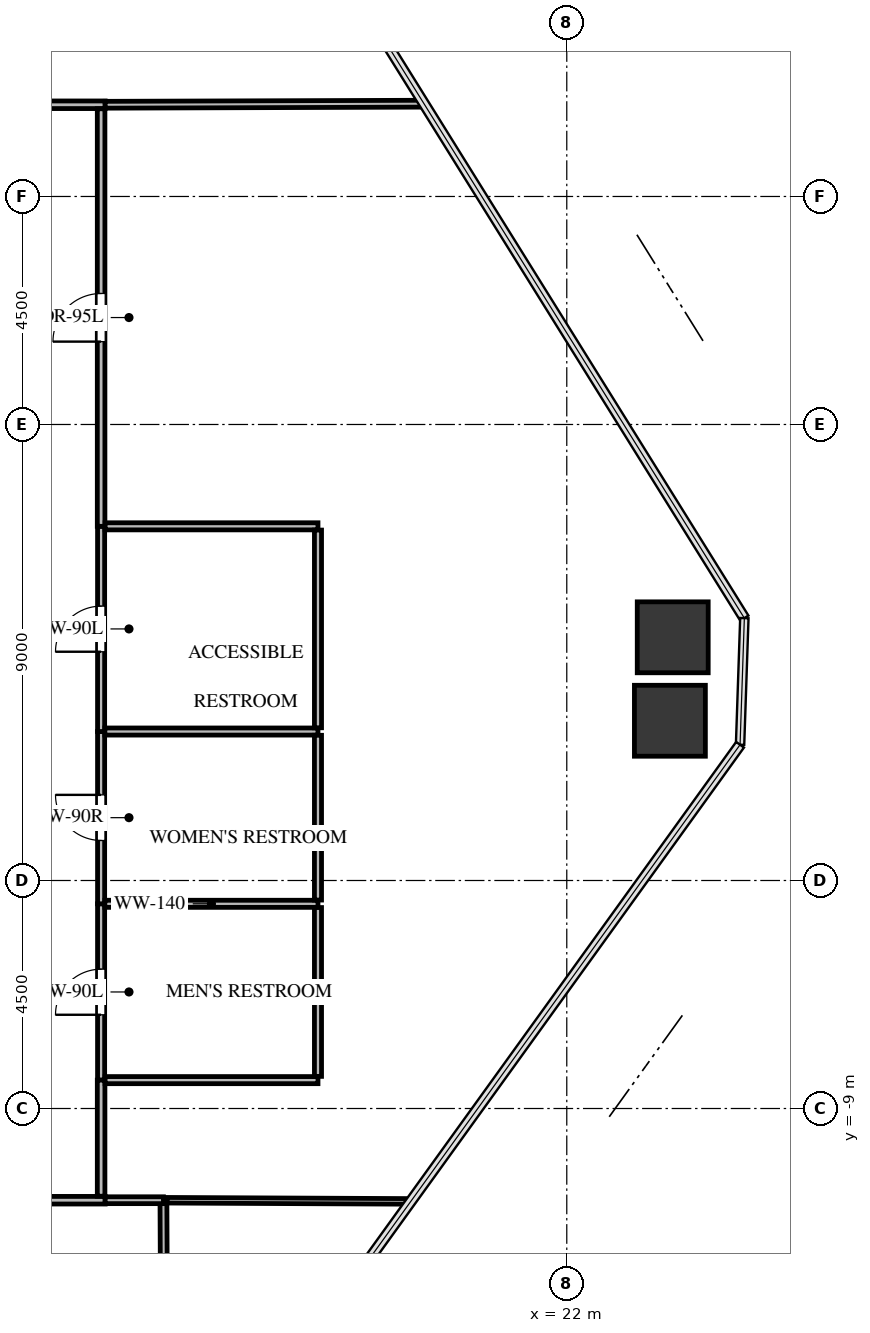
"""IFC4 building model, lengths in metres.
Left out: names, types, materials, properties, quantities, classifications, styles, units other than length and angle.
Written with IfcOpenShell. Run it as: python <this file> out.ifc"""

import sys

from ifc_helpers import new_model, si_unit, direction, frame, frame_2d, origin, origin_2d, place, context, subcontext, project, spatial, rectangle, extrude, source, transform, mapped, element, fill, save


model = new_model("IFC4")
c1 = context("Model", 3, precision=1e-05, world=origin(), true_north=direction((0.0, 1.0)))
c2 = subcontext(c1, "Body", "Model", "MODEL_VIEW")
j1 = project(units=[si_unit("LENGTHUNIT", "METRE"), si_unit("PLANEANGLEUNIT", "RADIAN")], contexts=[c1])
p1 = place(None, origin())
s1 = spatial("IfcSite", under=j1, at=p1, CompositionType="ELEMENT")
p2 = place(p1, origin())
s2 = spatial("IfcBuilding", under=s1, at=p2, CompositionType="ELEMENT")
p3 = place(p2, frame((0.0, 0.0, 84.3)))
s3 = spatial("IfcBuildingStorey", under=s2, at=p3, CompositionType="ELEMENT", Elevation=84.3)
m1 = source(origin(), c2, "Body", "SweptSolid", [
    extrude(rectangle(XDim=1.4, YDim=1.4, at=origin_2d()), origin(), (0.0, 0.0, 1.0), 4.14),
])
for number, where, z_axis, x_axis in (
    (1, (24.091, 0.3, -0.24), (0.0, 0.0, 1.0), (1.0, 0.0, 0.0)),
    (2, (24.035, -1.347, -0.24), (0.0, 0.0, 1.0), (1.0, 0.0, 0.0)),
):
    element("IfcColumn", number, at=place(p3, frame(where, z_axis=z_axis, x_axis=x_axis)), inside=s3, PredefinedType="COLUMN", context=c2, shape_type="MappedRepresentation", body=[
        mapped(m1, transform((0.0, 0.0, 0.0), x_axis=(1.0, 0.0, 0.0), y_axis=(0.0, 1.0, 0.0), z_axis=(0.0, 0.0, 1.0), scale=1.0)),
    ])
p4 = place(p3, frame((12.81, -8.44, 0.0), z_axis=(0.0, 0.0, 1.0), x_axis=(0.0, 1.0, 0.0)))
e3 = element("IfcWall", 3, at=p4, inside=s3, PredefinedType="PARTITIONING", context=c2, shape_type="SweptSolid", body=[
    extrude(rectangle(XDim=3.48, YDim=0.14, at=frame_2d((1.74, 0.0))), origin(), (0.0, 0.0, 1.0), 3.885),
])
p5 = place(p4, frame((1.29, 0.0, 0.0)))
e4 = element("IfcOpeningElement", 4, at=p5, cuts=e3, PredefinedType="OPENING", context=c2, shape_type="SweptSolid", body=[
    extrude(rectangle(XDim=0.9, YDim=2.05, at=frame_2d((0.45, 1.025))), frame((0.0, 0.08, 0.0), z_axis=(0.0, -1.0, 0.0), x_axis=(1.0, 0.0, 0.0)), (0.0, 0.0, 1.0), 0.16),
])
p6 = place(p3, frame((12.81, -4.96, 0.0), z_axis=(0.0, 0.0, 1.0), x_axis=(0.0, 1.0, 0.0)))
e5 = element("IfcWall", 5, at=p6, inside=s3, PredefinedType="PARTITIONING", context=c2, shape_type="SweptSolid", body=[
    extrude(rectangle(XDim=3.4, YDim=0.14, at=frame_2d((1.7, 0.0))), origin(), (0.0, 0.0, 1.0), 3.885),
])
p7 = place(p6, frame((1.25, 0.0, 0.0)))
e6 = element("IfcOpeningElement", 6, at=p7, cuts=e5, PredefinedType="OPENING", context=c2, shape_type="SweptSolid", body=[
    extrude(rectangle(XDim=0.9, YDim=2.05, at=frame_2d((0.45, 1.025))), frame((0.0, 0.08, 0.0), z_axis=(0.0, -1.0, 0.0), x_axis=(1.0, 0.0, 0.0)), (0.0, 0.0, 1.0), 0.16),
])
p8 = place(p3, frame((12.81, -1.56, 0.0), z_axis=(0.0, 0.0, 1.0), x_axis=(0.0, 1.0, 0.0)))
e7 = element("IfcWall", 7, at=p8, inside=s3, PredefinedType="PARTITIONING", context=c2, shape_type="SweptSolid", body=[
    extrude(rectangle(XDim=4.05, YDim=0.14, at=frame_2d((2.025, 0.0))), origin(), (0.0, 0.0, 1.0), 2.32),
])
p9 = place(p8, frame((1.575, 0.0, 0.0)))
e8 = element("IfcOpeningElement", 8, at=p9, cuts=e7, PredefinedType="OPENING", context=c2, shape_type="SweptSolid", body=[
    extrude(rectangle(XDim=0.9, YDim=2.05, at=frame_2d((0.45, 1.025))), frame((0.0, 0.08, 0.0), z_axis=(0.0, -1.0, 0.0), x_axis=(1.0, 0.0, 0.0)), (0.0, 0.0, 1.0), 0.16),
])
p10 = place(p3, frame((12.89, 10.81, 0.0), z_axis=(0.0, 0.0, 1.0), x_axis=(-1.0, 0.0, 0.0)))
e9 = element("IfcWall", 9, at=p10, inside=s3, PredefinedType="PARTITIONING", context=c2, shape_type="SweptSolid", body=[
    extrude(rectangle(XDim=9.85, YDim=0.15, at=frame_2d((4.925, 0.0))), origin(), (0.0, 0.0, 1.0), 2.32),
])
p11 = place(p10, frame((4.45, 0.0, 0.0)))
e10 = element("IfcOpeningElement", 10, at=p11, cuts=e9, PredefinedType="OPENING", context=c2, shape_type="SweptSolid", body=[
    extrude(rectangle(XDim=0.95, YDim=2.1, at=frame_2d((0.475, 1.05))), frame((0.0, 0.085, 0.0), z_axis=(0.0, -1.0, 0.0), x_axis=(1.0, 0.0, 0.0)), (0.0, 0.0, 1.0), 0.17),
])
p12 = place(p3, frame((5.04, -10.81, 0.0), z_axis=(0.0, 0.0, 1.0), x_axis=(1.0, 0.0, 0.0)))
e11 = element("IfcWall", 11, at=p12, inside=s3, PredefinedType="PARTITIONING", context=c2, shape_type="SweptSolid", body=[
    extrude(rectangle(XDim=7.85, YDim=0.15, at=frame_2d((3.925, 0.0))), origin(), (0.0, 0.0, 1.0), 2.32),
])
p13 = place(p12, frame((3.465, 0.0, 0.0)))
e12 = element("IfcOpeningElement", 12, at=p13, cuts=e11, PredefinedType="OPENING", context=c2, shape_type="SweptSolid", body=[
    extrude(rectangle(XDim=0.92, YDim=2.1, at=frame_2d((0.46, 1.05))), frame((0.0, 0.085, 0.0), z_axis=(0.0, -1.0, 0.0), x_axis=(1.0, 0.0, 0.0)), (0.0, 0.0, 1.0), 0.17),
])
p14 = place(p3, frame((12.81, 2.49, 0.0), z_axis=(0.0, 0.0, 1.0), x_axis=(0.0, 1.0, 0.0)))
e13 = element("IfcWall", 13, at=p14, inside=s3, PredefinedType="PARTITIONING", context=c2, shape_type="SweptSolid", body=[
    extrude(rectangle(XDim=8.241, YDim=0.15, at=frame_2d((4.121, 0.0))), origin(), (0.0, 0.0, 1.0), 3.885),
])
p15 = place(p14, frame((3.646, 0.0, 0.0)))
e14 = element("IfcOpeningElement", 14, at=p15, cuts=e13, PredefinedType="OPENING", context=c2, shape_type="SweptSolid", body=[
    extrude(rectangle(XDim=0.95, YDim=2.1, at=frame_2d((0.475, 1.05))), frame((0.0, 0.085, 0.0), z_axis=(0.0, -1.0, 0.0), x_axis=(1.0, 0.0, 0.0)), (0.0, 0.0, 1.0), 0.17),
])
p16 = place(p3, frame((12.81, -10.731, 0.0), z_axis=(0.0, 0.0, 1.0), x_axis=(0.0, 1.0, 0.0)))
e15 = element("IfcWall", 15, at=p16, inside=s3, PredefinedType="PARTITIONING", context=c2, shape_type="SweptSolid", body=[
    extrude(rectangle(XDim=2.291, YDim=0.15, at=frame_2d((1.146, 0.0))), origin(), (0.0, 0.0, 1.0), 3.885),
])
p17 = place(p3, frame((12.884, -4.96, 0.0), z_axis=(0.0, 0.0, 1.0), x_axis=(1.0, 0.0, 0.0)))
e16 = element("IfcWall", 16, at=p17, inside=s3, PredefinedType="PARTITIONING", context=c2, shape_type="SweptSolid", body=[
    extrude(rectangle(XDim=4.206, YDim=0.14, at=frame_2d((2.103, 0.0))), origin(), (0.0, 0.0, 1.0), 3.885),
])
p18 = place(p3, frame((17.09, -8.44, 0.0), z_axis=(0.0, 0.0, 1.0), x_axis=(-1.0, 0.0, 0.0)))
e17 = element("IfcWall", 17, at=p18, inside=s3, PredefinedType="PARTITIONING", context=c2, shape_type="SweptSolid", body=[
    extrude(rectangle(XDim=4.201, YDim=0.14, at=frame_2d((2.101, 0.0))), origin(), (0.0, 0.0, 1.0), 3.885),
])
p19 = place(p3, frame((17.09, -5.034, 0.0), z_axis=(0.0, 0.0, 1.0), x_axis=(0.0, -1.0, 0.0)))
e18 = element("IfcWall", 18, at=p19, inside=s3, PredefinedType="PARTITIONING", context=c2, shape_type="SweptSolid", body=[
    extrude(rectangle(XDim=3.332, YDim=0.14, at=frame_2d((1.666, 0.0))), origin(), (0.0, 0.0, 1.0), 3.885),
])
p20 = place(p3, frame((12.884, -1.56, 0.0), z_axis=(0.0, 0.0, 1.0), x_axis=(1.0, 0.0, 0.0)))
e19 = element("IfcWall", 19, at=p20, inside=s3, PredefinedType="PARTITIONING", context=c2, shape_type="SweptSolid", body=[
    extrude(rectangle(XDim=4.206, YDim=0.14, at=frame_2d((2.103, 0.0))), origin(), (0.0, 0.0, 1.0), 3.885),
])
p21 = place(p3, frame((17.09, -1.634, 0.0), z_axis=(0.0, 0.0, 1.0), x_axis=(0.0, -1.0, 0.0)))
e20 = element("IfcWall", 20, at=p21, inside=s3, PredefinedType="PARTITIONING", context=c2, shape_type="SweptSolid", body=[
    extrude(rectangle(XDim=3.252, YDim=0.14, at=frame_2d((1.626, 0.0))), origin(), (0.0, 0.0, 1.0), 3.885),
])
p22 = place(p3, frame((12.889, 2.49, 0.0), z_axis=(0.0, 0.0, 1.0), x_axis=(1.0, 0.0, 0.0)))
e21 = element("IfcWall", 21, at=p22, inside=s3, PredefinedType="PARTITIONING", context=c2, shape_type="SweptSolid", body=[
    extrude(rectangle(XDim=4.201, YDim=0.14, at=frame_2d((2.101, 0.0))), origin(), (0.0, 0.0, 1.0), 3.885),
])
p23 = place(p3, frame((17.09, 2.416, 0.0), z_axis=(0.0, 0.0, 1.0), x_axis=(0.0, -1.0, 0.0)))
e22 = element("IfcWall", 22, at=p23, inside=s3, PredefinedType="PARTITIONING", context=c2, shape_type="SweptSolid", body=[
    extrude(rectangle(XDim=3.902, YDim=0.14, at=frame_2d((1.951, 0.0))), origin(), (0.0, 0.0, 1.0), 2.32),
])
p24 = place(p3, frame((19.182, 10.831, 0.0), z_axis=(0.0, 0.0, 1.0), x_axis=(-0.999994432845, -0.003336806783, 0.0)))
e23 = element("IfcWall", 23, at=p24, inside=s3, PredefinedType="PARTITIONING", context=c2, shape_type="SweptSolid", body=[
    extrude(rectangle(XDim=6.292, YDim=0.135, at=frame_2d((3.146, 0.0))), origin(), (0.0, 0.0, 1.0), 2.32),
])
p25 = place(p3, frame((14.04, -10.81, 0.0), z_axis=(0.0, 0.0, 1.0), x_axis=(0.004810766872, -0.999988428194, 0.0)))
e24 = element("IfcWall", 24, at=p25, inside=s3, PredefinedType="PARTITIONING", context=c2, shape_type="SweptSolid", body=[
    extrude(rectangle(XDim=6.75, YDim=0.135, at=frame_2d((3.375, 0.0))), origin(), (0.0, 0.0, 1.0), 2.32),
])
p26 = place(p25, frame((2.925, 0.0, 0.0)))
e25 = element("IfcOpeningElement", 25, at=p26, cuts=e24, PredefinedType="OPENING", context=c2, shape_type="SweptSolid", body=[
    extrude(rectangle(XDim=0.9, YDim=2.05, at=frame_2d((0.45, 1.025))), frame((0.0, 0.078, 0.0), z_axis=(0.0, -1.0, 0.0), x_axis=(1.0, 0.0, 0.0)), (0.0, 0.0, 1.0), 0.155),
])
p27 = place(p3, frame((12.89, -10.81, 0.0), z_axis=(0.0, 0.0, 1.0), x_axis=(1.0, 0.0, 0.0)))
e26 = element("IfcWall", 26, at=p27, inside=s3, PredefinedType="PARTITIONING", context=c2, shape_type="SweptSolid", body=[
    extrude(rectangle(XDim=1.15, YDim=0.135, at=frame_2d((0.575, 0.0))), origin(), (0.0, 0.0, 1.0), 3.885),
])
p28 = place(p3, frame((14.112, -10.811, 0.0), z_axis=(0.0, 0.0, 1.0), x_axis=(0.999988860545, -0.004720040808, 0.0)))
e27 = element("IfcWall", 27, at=p28, inside=s3, PredefinedType="MOVABLE", context=c2, shape_type="SweptSolid", body=[
    extrude(rectangle(XDim=4.81, YDim=0.11, at=frame_2d((2.405, 0.0))), origin(), (0.0, 0.0, 1.0), 2.32),
])
m2 = source(origin(), c2, "Body", "SweptSolid", [
    extrude(rectangle(XDim=0.9, YDim=2.05, at=frame_2d((0.45, 1.025))), frame((0.0, 0.025, 0.0), z_axis=(0.0, -1.0, 0.0), x_axis=(1.0, 0.0, 0.0)), (0.0, 0.0, 1.0), 0.05),
])
p29 = place(p5, origin())
e28 = element("IfcDoor", 28, at=p29, inside=s3, OperationType="SINGLE_SWING_LEFT", PredefinedType="DOOR", context=c2, shape_type="MappedRepresentation", body=[
    mapped(m2, transform((0.0, 0.0, 0.0), x_axis=(1.0, 0.0, 0.0), y_axis=(0.0, 1.0, 0.0), z_axis=(0.0, 0.0, 1.0), scale=1.0)),
])
fill(e4, e28)
m3 = source(origin(), c2, "Body", "SweptSolid", [
    extrude(rectangle(XDim=0.9, YDim=2.05, at=frame_2d((0.45, 1.025))), frame((0.0, 0.025, 0.0), z_axis=(0.0, -1.0, 0.0), x_axis=(1.0, 0.0, 0.0)), (0.0, 0.0, 1.0), 0.05),
])
p30 = place(p7, origin())
e29 = element("IfcDoor", 29, at=p30, inside=s3, OperationType="SINGLE_SWING_RIGHT", PredefinedType="DOOR", context=c2, shape_type="MappedRepresentation", body=[
    mapped(m3, transform((0.0, 0.0, 0.0), x_axis=(1.0, 0.0, 0.0), y_axis=(0.0, 1.0, 0.0), z_axis=(0.0, 0.0, 1.0), scale=1.0)),
])
fill(e6, e29)
p31 = place(p9, origin())
e30 = element("IfcDoor", 30, at=p31, inside=s3, OperationType="SINGLE_SWING_LEFT", PredefinedType="DOOR", context=c2, shape_type="MappedRepresentation", body=[
    mapped(m2, transform((0.0, 0.0, 0.0), x_axis=(1.0, 0.0, 0.0), y_axis=(0.0, 1.0, 0.0), z_axis=(0.0, 0.0, 1.0), scale=1.0)),
])
fill(e8, e30)
m4 = source(origin(), c2, "Body", "SweptSolid", [
    extrude(rectangle(XDim=0.95, YDim=2.1, at=frame_2d((0.475, 1.05))), frame((0.0, 0.025, 0.0), z_axis=(0.0, -1.0, 0.0), x_axis=(1.0, 0.0, 0.0)), (0.0, 0.0, 1.0), 0.05),
])
p32 = place(p15, origin())
e31 = element("IfcDoor", 31, at=p32, inside=s3, OperationType="SINGLE_SWING_LEFT", PredefinedType="DOOR", context=c2, shape_type="MappedRepresentation", body=[
    mapped(m4, transform((0.0, 0.0, 0.0), x_axis=(1.0, 0.0, 0.0), y_axis=(0.0, 1.0, 0.0), z_axis=(0.0, 0.0, 1.0), scale=1.0)),
])
fill(e14, e31)
save(model, sys.argv[1])
